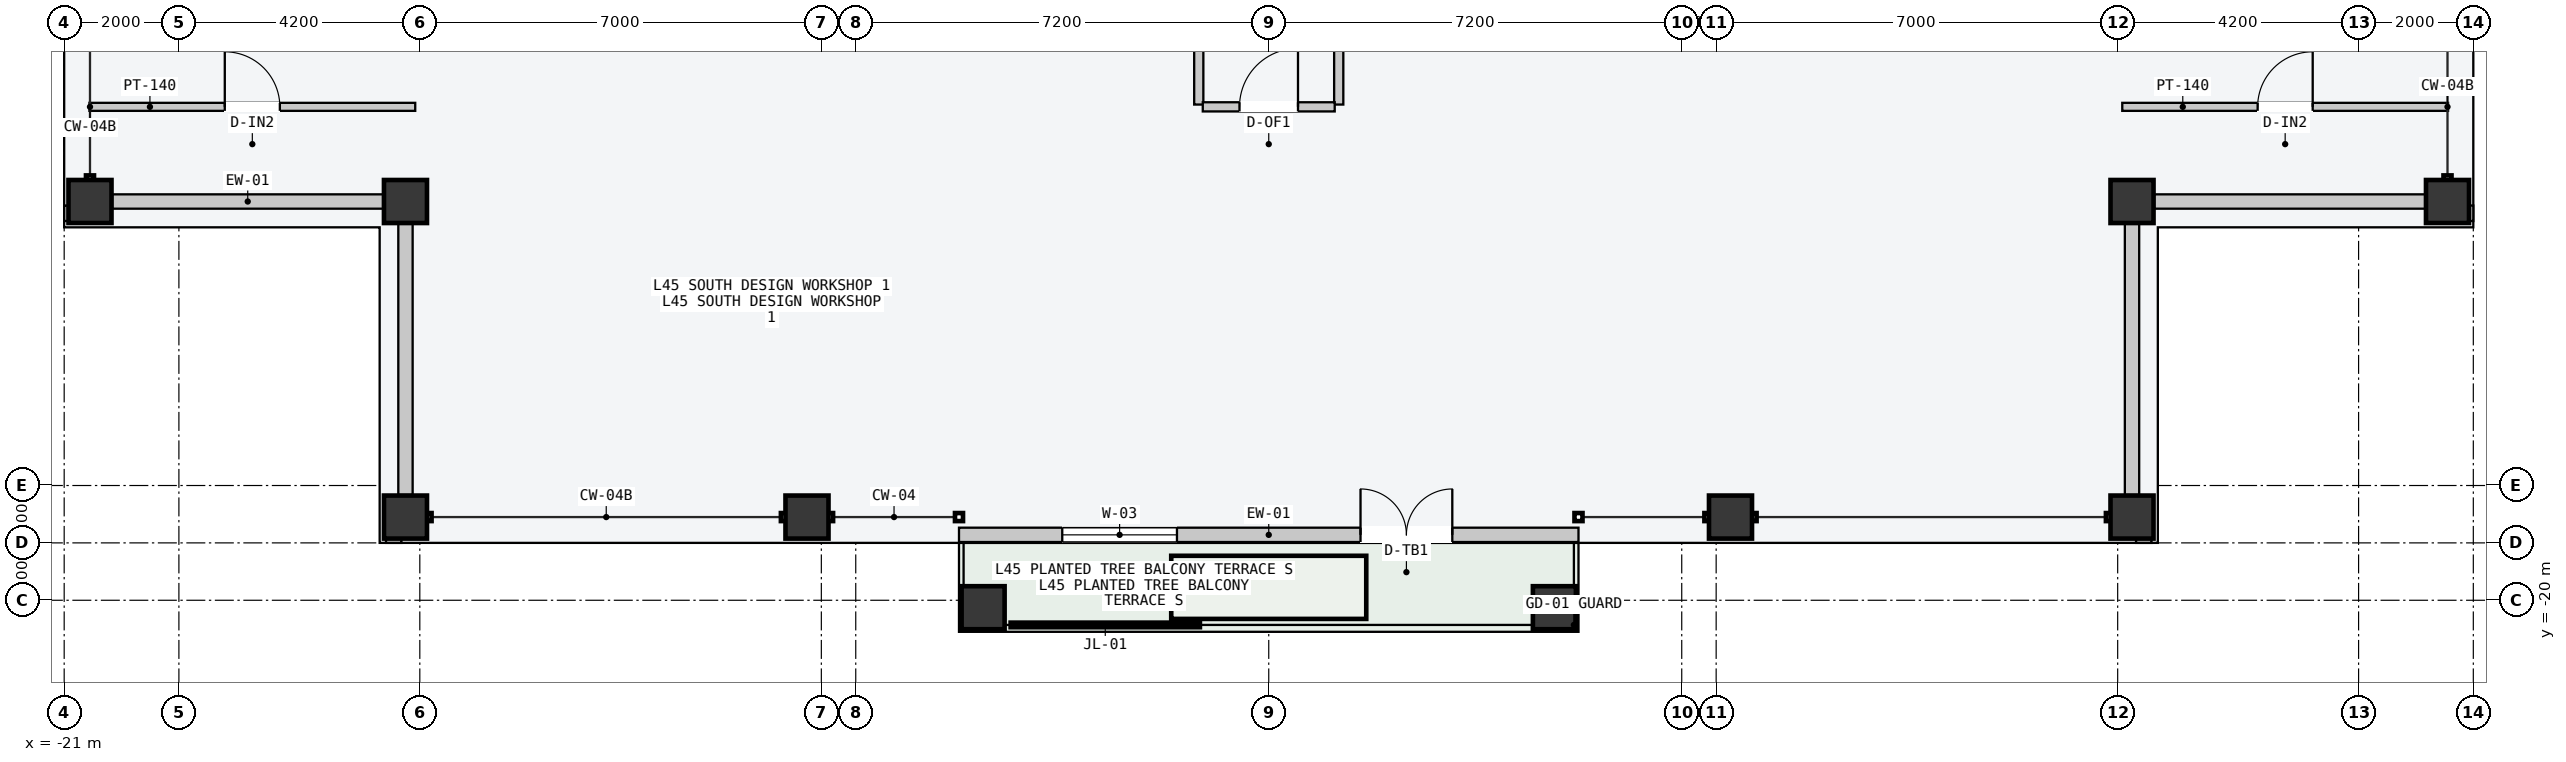
"""IFC4 building model, lengths in metres.
Left out: names, types, materials, properties, quantities, classifications, styles, units other than length and angle.
Written with IfcOpenShell. Run it as: python <this file> out.ifc"""

import sys

from ifc_helpers import new_model, si_unit, direction, frame, frame_2d, origin, origin_2d, place, context, subcontext, project, spatial, rectangle, hollow_rectangle, extrude, element, fill, save


model = new_model("IFC4")
c1 = context("Model", 3, precision=1e-05, world=origin(), true_north=direction((0.0, 1.0)))
c2 = subcontext(c1, "Body", "Model", "MODEL_VIEW")
j1 = project(units=[si_unit("LENGTHUNIT", "METRE"), si_unit("PLANEANGLEUNIT", "RADIAN")], contexts=[c1])
p1 = place(None, origin())
s1 = spatial("IfcSite", under=j1, at=p1, CompositionType="ELEMENT")
p2 = place(p1, origin())
s2 = spatial("IfcBuilding", under=s1, at=p2, CompositionType="ELEMENT")
p3 = place(p2, frame((0.0, 0.0, 173.1)))
s3 = spatial("IfcBuildingStorey", under=s2, at=p3, CompositionType="ELEMENT", Elevation=173.1)
for number, where, z_axis, x_axis in (
    (1, (-15.05, -18.55, 0.0), (0.0, 0.0, 1.0), (1.0, 0.0, 0.0)),
    (2, (-8.05, -18.55, 0.0), (0.0, 0.0, 1.0), (1.0, 0.0, 0.0)),
    (3, (8.05, -18.55, 0.0), (0.0, 0.0, 1.0), (1.0, 0.0, 0.0)),
    (4, (15.05, -18.55, 0.0), (0.0, 0.0, 1.0), (1.0, 0.0, 0.0)),
    (5, (-20.55, -13.05, 0.0), (0.0, 0.0, 1.0), (0.0, 1.0, 0.0)),
    (6, (20.55, -13.05, 0.0), (0.0, 0.0, 1.0), (0.0, 1.0, 0.0)),
    (7, (15.05, -13.05, 0.0), (0.0, 0.0, 1.0), (1.0, 0.0, 0.0)),
    (8, (-15.05, -13.05, 0.0), (0.0, 0.0, 1.0), (1.0, 0.0, 0.0)),
    (9, (-4.98, -20.13, 0.0), (0.0, 0.0, 1.0), (1.0, 0.0, 0.0)),
    (10, (4.98, -20.13, 0.0), (0.0, 0.0, 1.0), (1.0, 0.0, 0.0)),
):
    element("IfcColumn", number, at=place(p3, frame(where, z_axis=z_axis, x_axis=x_axis)), inside=s3, PredefinedType="COLUMN", context=c2, shape_type="SweptSolid", body=[
        extrude(hollow_rectangle(XDim=0.75, YDim=0.75, WallThickness=0.032, at=origin_2d()), origin(), (0.0, 0.0, 1.0), 3.6),
    ])
p4 = place(p3, frame((-5.4, -18.86, 0.0), z_axis=(0.0, 0.0, 1.0), x_axis=(1.0, 0.0, 0.0)))
e11 = element("IfcWall", 11, at=p4, inside=s3, PredefinedType="STANDARD", context=c2, shape_type="SweptSolid", body=[
    extrude(rectangle(XDim=10.8, YDim=0.25, at=frame_2d((5.4, 0.0))), origin(), (0.0, 0.0, 1.0), 3.4),
])
p5 = place(p4, frame((7.0, 0.0, 0.0)))
e12 = element("IfcOpeningElement", 12, at=p5, cuts=e11, PredefinedType="OPENING", context=c2, shape_type="SweptSolid", body=[
    extrude(rectangle(XDim=1.6, YDim=2.2, at=frame_2d((0.8, 1.1))), frame((0.0, 0.135, 0.0), z_axis=(0.0, -1.0, 0.0), x_axis=(1.0, 0.0, 0.0)), (0.0, 0.0, 1.0), 0.27),
])
p6 = place(p4, frame((1.8, 0.0, 0.85)))
e13 = element("IfcOpeningElement", 13, at=p6, cuts=e11, PredefinedType="OPENING", context=c2, shape_type="SweptSolid", body=[
    extrude(rectangle(XDim=2.0, YDim=2.1, at=frame_2d((1.0, 1.05))), frame((0.0, 0.135, 0.0), z_axis=(0.0, -1.0, 0.0), x_axis=(1.0, 0.0, 0.0)), (0.0, 0.0, 1.0), 0.27),
])
for number, where, z_axis, x_axis in (
    (14, (-20.165, -13.05, 0.0), (0.0, 0.0, 1.0), (1.0, 0.0, 0.0)),
    (15, (-15.05, -18.165, 0.0), (0.0, 0.0, 1.0), (0.0, 1.0, 0.0)),
    (16, (15.435, -13.05, 0.0), (0.0, 0.0, 1.0), (1.0, 0.0, 0.0)),
    (17, (15.05, -18.165, 0.0), (0.0, 0.0, 1.0), (0.0, 1.0, 0.0)),
):
    element("IfcWall", number, at=place(p3, frame(where, z_axis=z_axis, x_axis=x_axis)), inside=s3, PredefinedType="STANDARD", context=c2, shape_type="SweptSolid", body=[
        extrude(rectangle(XDim=4.73, YDim=0.25, at=frame_2d((2.365, 0.0))), origin(), (0.0, 0.0, 1.0), 2.75),
    ])
for number, where, z_axis, x_axis in (
    (18, (-15.39, -18.89, 0.0), (0.0, 0.0, 1.0), (1.0, 0.0, 0.0)),
    (19, (-20.89, -13.39, 0.0), (0.0, 0.0, 1.0), (0.0, 1.0, 0.0)),
    (20, (15.12, -18.89, 0.0), (0.0, 0.0, 1.0), (1.0, 0.0, 0.0)),
    (21, (20.89, -13.39, 0.0), (0.0, 0.0, 1.0), (0.0, 1.0, 0.0)),
):
    element("IfcWall", number, at=place(p3, frame(where, z_axis=z_axis, x_axis=x_axis)), inside=s3, PredefinedType="PARAPET", context=c2, shape_type="SweptSolid", body=[
        extrude(rectangle(XDim=0.27, YDim=0.22, at=frame_2d((0.135, 0.0))), origin(), (0.0, 0.0, 1.0), 1.2),
    ])
p7 = place(p3, frame((-1.22, -11.36, 0.0), z_axis=(0.0, 0.0, 1.0), x_axis=(0.0, 1.0, 0.0)))
e22 = element("IfcWall", 22, at=p7, inside=s3, PredefinedType="PARTITIONING", context=c2, shape_type="SweptSolid", body=[
    extrude(rectangle(XDim=5.68, YDim=0.16, at=frame_2d((2.84, 0.0))), origin(), (0.0, 0.0, 1.0), 3.4),
])
p8 = place(p7, frame((1.15, 0.0, 0.0)))
e23 = element("IfcOpeningElement", 23, at=p8, cuts=e22, PredefinedType="OPENING", context=c2, shape_type="SweptSolid", body=[
    extrude(rectangle(XDim=0.96, YDim=2.18, at=frame_2d((0.48, 1.09))), frame((0.0, 0.09, 0.0), z_axis=(0.0, -1.0, 0.0), x_axis=(1.0, 0.0, 0.0)), (0.0, 0.0, 1.0), 0.18),
])
p9 = place(p3, frame((1.22, -11.36, 0.0), z_axis=(0.0, 0.0, 1.0), x_axis=(0.0, 1.0, 0.0)))
e24 = element("IfcWall", 24, at=p9, inside=s3, PredefinedType="PARTITIONING", context=c2, shape_type="SweptSolid", body=[
    extrude(rectangle(XDim=5.68, YDim=0.16, at=frame_2d((2.84, 0.0))), origin(), (0.0, 0.0, 1.0), 3.4),
])
p10 = place(p9, frame((1.15, 0.0, 0.0)))
e25 = element("IfcOpeningElement", 25, at=p10, cuts=e24, PredefinedType="OPENING", context=c2, shape_type="SweptSolid", body=[
    extrude(rectangle(XDim=0.96, YDim=2.18, at=frame_2d((0.48, 1.09))), frame((0.0, 0.09, 0.0), z_axis=(0.0, -1.0, 0.0), x_axis=(1.0, 0.0, 0.0)), (0.0, 0.0, 1.0), 0.18),
])
p11 = place(p3, frame((-1.15, -11.4, 0.0), z_axis=(0.0, 0.0, 1.0), x_axis=(1.0, 0.0, 0.0)))
e26 = element("IfcWall", 26, at=p11, inside=s3, PredefinedType="PARTITIONING", context=c2, shape_type="SweptSolid", body=[
    extrude(rectangle(XDim=2.3, YDim=0.16, at=frame_2d((1.15, 0.0))), origin(), (0.0, 0.0, 1.0), 3.4),
])
p12 = place(p11, frame((0.64, 0.0, 0.0)))
e27 = element("IfcOpeningElement", 27, at=p12, cuts=e26, PredefinedType="OPENING", context=c2, shape_type="SweptSolid", body=[
    extrude(rectangle(XDim=1.02, YDim=2.2, at=frame_2d((0.51, 1.1))), frame((0.0, 0.09, 0.0), z_axis=(0.0, -1.0, 0.0), x_axis=(1.0, 0.0, 0.0)), (0.0, 0.0, 1.0), 0.18),
])
p13 = place(p3, frame((-20.56, -11.4, 0.0), z_axis=(0.0, 0.0, 1.0), x_axis=(1.0, 0.0, 0.0)))
e28 = element("IfcWall", 28, at=p13, inside=s3, PredefinedType="PARTITIONING", context=c2, shape_type="SweptSolid", body=[
    extrude(rectangle(XDim=5.68, YDim=0.14, at=frame_2d((2.84, 0.0))), origin(), (0.0, 0.0, 1.0), 3.4),
])
p14 = place(p13, frame((2.36, 0.0, 0.0)))
e29 = element("IfcOpeningElement", 29, at=p14, cuts=e28, PredefinedType="OPENING", context=c2, shape_type="SweptSolid", body=[
    extrude(rectangle(XDim=0.96, YDim=2.18, at=frame_2d((0.48, 1.09))), frame((0.0, 0.08, 0.0), z_axis=(0.0, -1.0, 0.0), x_axis=(1.0, 0.0, 0.0)), (0.0, 0.0, 1.0), 0.16),
])
p15 = place(p3, frame((14.88, -11.4, 0.0), z_axis=(0.0, 0.0, 1.0), x_axis=(1.0, 0.0, 0.0)))
e30 = element("IfcWall", 30, at=p15, inside=s3, PredefinedType="PARTITIONING", context=c2, shape_type="SweptSolid", body=[
    extrude(rectangle(XDim=5.68, YDim=0.14, at=frame_2d((2.84, 0.0))), origin(), (0.0, 0.0, 1.0), 3.4),
])
p16 = place(p15, frame((2.36, 0.0, 0.0)))
e31 = element("IfcOpeningElement", 31, at=p16, cuts=e30, PredefinedType="OPENING", context=c2, shape_type="SweptSolid", body=[
    extrude(rectangle(XDim=0.96, YDim=2.18, at=frame_2d((0.48, 1.09))), frame((0.0, 0.08, 0.0), z_axis=(0.0, -1.0, 0.0), x_axis=(1.0, 0.0, 0.0)), (0.0, 0.0, 1.0), 0.16),
])
p17 = place(p5, origin())
e32 = element("IfcDoor", 32, at=p17, inside=s3, OperationType="DOUBLE_DOOR_SINGLE_SWING", PredefinedType="DOOR", context=c2, shape_type="SweptSolid", body=[
    extrude(rectangle(XDim=1.6, YDim=2.2, at=frame_2d((0.8, 1.1))), frame((0.0, 0.025, 0.0), z_axis=(0.0, -1.0, 0.0), x_axis=(1.0, 0.0, 0.0)), (0.0, 0.0, 1.0), 0.05),
])
fill(e12, e32)
p18 = place(p6, origin())
e33 = element("IfcWindow", 33, at=p18, inside=s3, PartitioningType="SINGLE_PANEL", PredefinedType="WINDOW", context=c2, shape_type="SweptSolid", body=[
    extrude(rectangle(XDim=2.0, YDim=2.1, at=frame_2d((1.0, 1.05))), frame((0.0, 0.03, 0.0), z_axis=(0.0, -1.0, 0.0), x_axis=(1.0, 0.0, 0.0)), (0.0, 0.0, 1.0), 0.06),
])
fill(e13, e33)
p19 = place(p12, origin())
e34 = element("IfcDoor", 34, at=p19, inside=s3, OperationType="SINGLE_SWING_RIGHT", PredefinedType="DOOR", context=c2, shape_type="SweptSolid", body=[
    extrude(rectangle(XDim=1.02, YDim=2.2, at=frame_2d((0.51, 1.1))), frame((0.0, 0.025, 0.0), z_axis=(0.0, -1.0, 0.0), x_axis=(1.0, 0.0, 0.0)), (0.0, 0.0, 1.0), 0.05),
])
fill(e27, e34)
p20 = place(p14, origin())
e35 = element("IfcDoor", 35, at=p20, inside=s3, OperationType="SINGLE_SWING_LEFT", PredefinedType="DOOR", context=c2, shape_type="SweptSolid", body=[
    extrude(rectangle(XDim=0.96, YDim=2.18, at=frame_2d((0.48, 1.09))), frame((0.0, 0.025, 0.0), z_axis=(0.0, -1.0, 0.0), x_axis=(1.0, 0.0, 0.0)), (0.0, 0.0, 1.0), 0.05),
])
fill(e29, e35)
p21 = place(p16, origin())
e36 = element("IfcDoor", 36, at=p21, inside=s3, OperationType="SINGLE_SWING_RIGHT", PredefinedType="DOOR", context=c2, shape_type="SweptSolid", body=[
    extrude(rectangle(XDim=0.96, YDim=2.18, at=frame_2d((0.48, 1.09))), frame((0.0, 0.025, 0.0), z_axis=(0.0, -1.0, 0.0), x_axis=(1.0, 0.0, 0.0)), (0.0, 0.0, 1.0), 0.05),
])
fill(e31, e36)
save(model, sys.argv[1])
